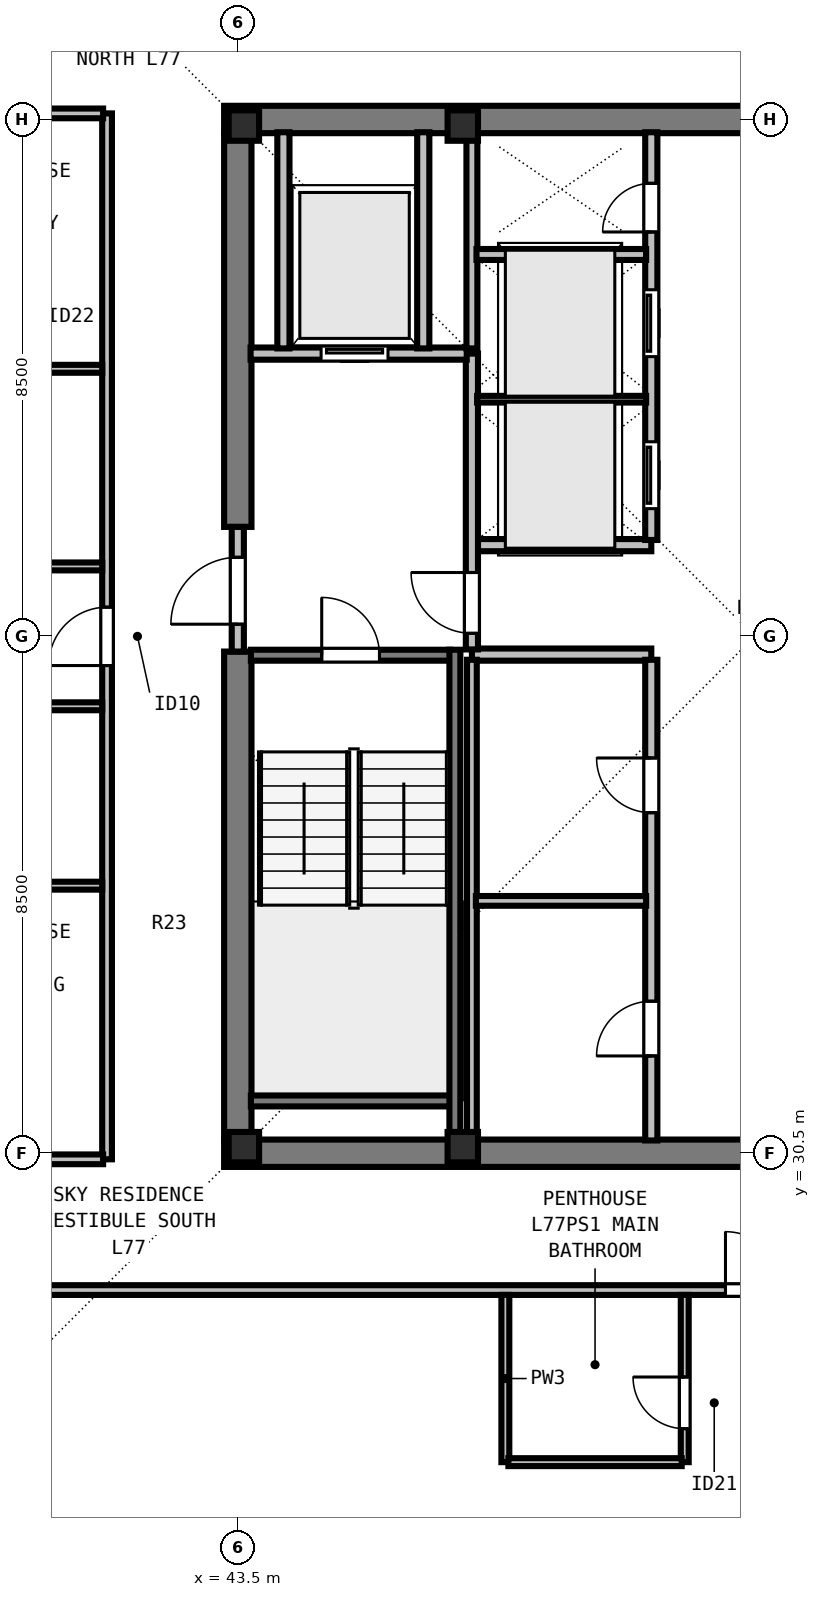
"""IFC4 building model, lengths in metres.
Left out: names, types, materials, properties, quantities, classifications, styles, units other than length and angle.
Written with IfcOpenShell. Run it as: python <this file> out.ifc"""

import sys

from ifc_helpers import new_model, si_unit, direction, frame, frame_2d, origin, origin_2d, place, context, subcontext, project, spatial, rectangle, i_section, extrude, element, fill, save


model = new_model("IFC4")
c1 = context("Model", 3, precision=1e-05, world=origin(), true_north=direction((0.0, 1.0)))
c2 = subcontext(c1, "Body", "Model", "MODEL_VIEW")
j1 = project(units=[si_unit("LENGTHUNIT", "METRE"), si_unit("PLANEANGLEUNIT", "RADIAN")], contexts=[c1])
p1 = place(None, origin())
s1 = spatial("IfcSite", under=j1, at=p1, CompositionType="ELEMENT")
p2 = place(p1, origin())
s2 = spatial("IfcBuilding", under=s1, at=p2, CompositionType="ELEMENT")
p3 = place(p2, frame((0.0, 0.0, 280.5)))
s3 = spatial("IfcBuildingStorey", under=s2, at=p3, CompositionType="ELEMENT", Elevation=280.5)
for number, where, z_axis, x_axis in (
    (1, (43.6, 30.6, 0.0), (0.0, 0.0, 1.0), (1.0, 0.0, 0.0)),
    (2, (47.2, 30.6, 0.0), (0.0, 0.0, 1.0), (1.0, 0.0, 0.0)),
    (3, (43.6, 47.4, 0.0), (0.0, 0.0, 1.0), (1.0, 0.0, 0.0)),
    (4, (47.2, 47.4, 0.0), (0.0, 0.0, 1.0), (1.0, 0.0, 0.0)),
):
    element("IfcColumn", number, at=place(p3, frame(where, z_axis=z_axis, x_axis=x_axis)), inside=s3, PredefinedType="COLUMN", context=c2, shape_type="SweptSolid", body=[
        extrude(i_section(OverallWidth=0.5, OverallDepth=0.5, WebThickness=0.028, FlangeThickness=0.045, at=origin_2d()), origin(), (0.0, 0.0, 1.0), 3.5),
    ])
for number, where, z_axis, x_axis in (
    (5, (43.275, 30.5, 0.0), (0.0, 0.0, 1.0), (1.0, 0.0, 0.0)),
    (6, (43.275, 47.5, 0.0), (0.0, 0.0, 1.0), (1.0, 0.0, 0.0)),
):
    element("IfcWall", number, at=place(p3, frame(where, z_axis=z_axis, x_axis=x_axis)), inside=s3, PredefinedType="SHEAR", context=c2, shape_type="SweptSolid", body=[
        extrude(rectangle(XDim=17.45, YDim=0.45, at=frame_2d((8.725, 0.0))), origin(), (0.0, 0.0, 1.0), 3.29),
    ])
p4 = place(p3, frame((43.5, 30.715, 0.0), z_axis=(0.0, 0.0, 1.0), x_axis=(0.0, 1.0, 0.0)))
e7 = element("IfcWall", 7, at=p4, inside=s3, PredefinedType="SHEAR", context=c2, shape_type="SweptSolid", body=[
    extrude(rectangle(XDim=8.035, YDim=0.45, at=frame_2d((4.018, 0.0))), origin(), (0.0, 0.0, 1.0), 3.29),
])
p5 = place(p3, frame((43.5, 40.8, 0.0), z_axis=(0.0, 0.0, 1.0), x_axis=(0.0, 1.0, 0.0)))
e8 = element("IfcWall", 8, at=p5, inside=s3, PredefinedType="SHEAR", context=c2, shape_type="SweptSolid", body=[
    extrude(rectangle(XDim=6.485, YDim=0.45, at=frame_2d((3.242, 0.0))), origin(), (0.0, 0.0, 1.0), 3.29),
])
for number, where, z_axis, x_axis in (
    (9, (47.35, 38.7, 0.0), (0.0, 0.0, 1.0), (1.0, 0.0, 0.0)),
    (10, (47.35, 40.5, 0.0), (0.0, 0.0, 1.0), (1.0, 0.0, 0.0)),
):
    element("IfcWall", number, at=place(p3, frame(where, z_axis=z_axis, x_axis=x_axis)), inside=s3, PredefinedType="SOLIDWALL", context=c2, shape_type="SweptSolid", body=[
        extrude(rectangle(XDim=2.95, YDim=0.2, at=frame_2d((1.475, 0.0))), origin(), (0.0, 0.0, 1.0), 3.29),
    ])
p6 = place(p3, frame((50.3, 30.71, 0.0), z_axis=(0.0, 0.0, 1.0), x_axis=(0.0, 1.0, 0.0)))
e11 = element("IfcWall", 11, at=p6, inside=s3, PredefinedType="SOLIDWALL", context=c2, shape_type="SweptSolid", body=[
    extrude(rectangle(XDim=7.905, YDim=0.2, at=frame_2d((3.953, 0.0))), origin(), (0.0, 0.0, 1.0), 3.29),
])
p7 = place(p6, frame((1.39, 0.0, 0.0)))
e12 = element("IfcOpeningElement", 12, at=p7, cuts=e11, PredefinedType="OPENING", context=c2, shape_type="SweptSolid", body=[
    extrude(rectangle(XDim=0.9, YDim=2.12, at=frame_2d((0.45, 1.06))), frame((0.0, 0.11, 0.0), z_axis=(0.0, -1.0, 0.0), x_axis=(1.0, 0.0, 0.0)), (0.0, 0.0, 1.0), 0.22),
])
p8 = place(p6, frame((5.39, 0.0, 0.0)))
e13 = element("IfcOpeningElement", 13, at=p8, cuts=e11, PredefinedType="OPENING", context=c2, shape_type="SweptSolid", body=[
    extrude(rectangle(XDim=0.9, YDim=2.12, at=frame_2d((0.45, 1.06))), frame((0.0, 0.11, 0.0), z_axis=(0.0, -1.0, 0.0), x_axis=(1.0, 0.0, 0.0)), (0.0, 0.0, 1.0), 0.22),
])
p9 = place(p3, frame((50.3, 40.585, 0.0), z_axis=(0.0, 0.0, 1.0), x_axis=(0.0, 1.0, 0.0)))
e14 = element("IfcWall", 14, at=p9, inside=s3, PredefinedType="SOLIDWALL", context=c2, shape_type="SweptSolid", body=[
    extrude(rectangle(XDim=6.705, YDim=0.2, at=frame_2d((3.353, 0.0))), origin(), (0.0, 0.0, 1.0), 3.29),
])
p10 = place(p9, frame((0.515, 0.0, 0.0)))
e15 = element("IfcOpeningElement", 15, at=p10, cuts=e14, PredefinedType="OPENING", context=c2, shape_type="SweptSolid", body=[
    extrude(rectangle(XDim=1.1, YDim=2.2, at=frame_2d((0.55, 1.1))), frame((0.0, 0.11, 0.0), z_axis=(0.0, -1.0, 0.0), x_axis=(1.0, 0.0, 0.0)), (0.0, 0.0, 1.0), 0.22),
])
p11 = place(p9, frame((3.015, 0.0, 0.0)))
e16 = element("IfcOpeningElement", 16, at=p11, cuts=e14, PredefinedType="OPENING", context=c2, shape_type="SweptSolid", body=[
    extrude(rectangle(XDim=1.1, YDim=2.2, at=frame_2d((0.55, 1.1))), frame((0.0, 0.11, 0.0), z_axis=(0.0, -1.0, 0.0), x_axis=(1.0, 0.0, 0.0)), (0.0, 0.0, 1.0), 0.22),
])
p12 = place(p9, frame((5.065, 0.0, 0.0)))
e17 = element("IfcOpeningElement", 17, at=p12, cuts=e14, PredefinedType="OPENING", context=c2, shape_type="SweptSolid", body=[
    extrude(rectangle(XDim=0.8, YDim=2.08, at=frame_2d((0.4, 1.04))), frame((0.0, 0.11, 0.0), z_axis=(0.0, -1.0, 0.0), x_axis=(1.0, 0.0, 0.0)), (0.0, 0.0, 1.0), 0.22),
])
p13 = place(p3, frame((43.5, 38.75, 0.0), z_axis=(0.0, 0.0, 1.0), x_axis=(0.0, 1.0, 0.0)))
e18 = element("IfcWall", 18, at=p13, inside=s3, PredefinedType="SOLIDWALL", context=c2, shape_type="SweptSolid", body=[
    extrude(rectangle(XDim=2.05, YDim=0.2, at=frame_2d((1.025, 0.0))), origin(), (0.0, 0.0, 1.0), 3.29),
])
p14 = place(p13, frame((0.45, 0.0, 0.0)))
e19 = element("IfcOpeningElement", 19, at=p14, cuts=e18, PredefinedType="OPENING", context=c2, shape_type="SweptSolid", body=[
    extrude(rectangle(XDim=1.1, YDim=2.15, at=frame_2d((0.55, 1.075))), frame((0.0, 0.11, 0.0), z_axis=(0.0, -1.0, 0.0), x_axis=(1.0, 0.0, 0.0)), (0.0, 0.0, 1.0), 0.22),
])
p15 = place(p3, frame((47.35, 38.785, 0.0), z_axis=(0.0, 0.0, 1.0), x_axis=(0.0, 1.0, 0.0)))
e20 = element("IfcWall", 20, at=p15, inside=s3, PredefinedType="SOLIDWALL", context=c2, shape_type="SweptSolid", body=[
    extrude(rectangle(XDim=4.865, YDim=0.2, at=frame_2d((2.433, 0.0))), origin(), (0.0, 0.0, 1.0), 3.29),
])
p16 = place(p15, frame((0.265, 0.0, 0.0)))
e21 = element("IfcOpeningElement", 21, at=p16, cuts=e20, PredefinedType="OPENING", context=c2, shape_type="SweptSolid", body=[
    extrude(rectangle(XDim=1.0, YDim=2.15, at=frame_2d((0.5, 1.075))), frame((0.0, 0.11, 0.0), z_axis=(0.0, -1.0, 0.0), x_axis=(1.0, 0.0, 0.0)), (0.0, 0.0, 1.0), 0.22),
])
p17 = place(p3, frame((43.71, 43.65, 0.0), z_axis=(0.0, 0.0, 1.0), x_axis=(1.0, 0.0, 0.0)))
e22 = element("IfcWall", 22, at=p17, inside=s3, PredefinedType="SOLIDWALL", context=c2, shape_type="SweptSolid", body=[
    extrude(rectangle(XDim=3.555, YDim=0.2, at=frame_2d((1.777, 0.0))), origin(), (0.0, 0.0, 1.0), 3.29),
])
p18 = place(p17, frame((1.16, 0.0, 0.0)))
e23 = element("IfcOpeningElement", 23, at=p18, cuts=e22, PredefinedType="OPENING", context=c2, shape_type="SweptSolid", body=[
    extrude(rectangle(XDim=1.1, YDim=2.2, at=frame_2d((0.55, 1.1))), frame((0.0, 0.11, 0.0), z_axis=(0.0, -1.0, 0.0), x_axis=(1.0, 0.0, 0.0)), (0.0, 0.0, 1.0), 0.22),
])
for number, where, z_axis, x_axis in (
    (24, (46.55, 43.735, 0.0), (0.0, 0.0, 1.0), (0.0, 1.0, 0.0)),
    (25, (44.25, 43.735, 0.0), (0.0, 0.0, 1.0), (0.0, 1.0, 0.0)),
):
    element("IfcWall", number, at=place(p3, frame(where, z_axis=z_axis, x_axis=x_axis)), inside=s3, PredefinedType="SOLIDWALL", context=c2, shape_type="SweptSolid", body=[
        extrude(rectangle(XDim=3.555, YDim=0.2, at=frame_2d((1.777, 0.0))), origin(), (0.0, 0.0, 1.0), 3.29),
    ])
p19 = place(p3, frame((47.35, 30.71, 0.0), z_axis=(0.0, 0.0, 1.0), x_axis=(0.0, 1.0, 0.0)))
e26 = element("IfcWall", 26, at=p19, inside=s3, PredefinedType="PARTITIONING", context=c2, shape_type="SweptSolid", body=[
    extrude(rectangle(XDim=7.905, YDim=0.16, at=frame_2d((3.953, 0.0))), origin(), (0.0, 0.0, 1.0), 3.29),
])
p20 = place(p3, frame((47.415, 34.65, 0.0), z_axis=(0.0, 0.0, 1.0), x_axis=(1.0, 0.0, 0.0)))
e27 = element("IfcWall", 27, at=p20, inside=s3, PredefinedType="PARTITIONING", context=c2, shape_type="SweptSolid", body=[
    extrude(rectangle(XDim=2.8, YDim=0.16, at=frame_2d((1.4, 0.0))), origin(), (0.0, 0.0, 1.0), 3.29),
])
p21 = place(p3, frame((47.35, 43.735, 0.0), z_axis=(0.0, 0.0, 1.0), x_axis=(0.0, 1.0, 0.0)))
e28 = element("IfcWall", 28, at=p21, inside=s3, PredefinedType="SOLIDWALL", context=c2, shape_type="SweptSolid", body=[
    extrude(rectangle(XDim=3.555, YDim=0.18, at=frame_2d((1.777, 0.0))), origin(), (0.0, 0.0, 1.0), 3.29),
])
p22 = place(p3, frame((47.435, 42.9, 0.0), z_axis=(0.0, 0.0, 1.0), x_axis=(1.0, 0.0, 0.0)))
e29 = element("IfcWall", 29, at=p22, inside=s3, PredefinedType="PARTITIONING", context=c2, shape_type="SweptSolid", body=[
    extrude(rectangle(XDim=2.78, YDim=0.11, at=frame_2d((1.39, 0.0))), origin(), (0.0, 0.0, 1.0), 3.29),
])
p23 = place(p3, frame((47.425, 45.28, 0.0), z_axis=(0.0, 0.0, 1.0), x_axis=(1.0, 0.0, 0.0)))
e30 = element("IfcWall", 30, at=p23, inside=s3, PredefinedType="SOLIDWALL", context=c2, shape_type="SweptSolid", body=[
    extrude(rectangle(XDim=2.79, YDim=0.18, at=frame_2d((1.395, 0.0))), origin(), (0.0, 0.0, 1.0), 3.29),
])
p24 = place(p3, frame((31.285, 28.25, 0.0), z_axis=(0.0, 0.0, 1.0), x_axis=(1.0, 0.0, 0.0)))
e31 = element("IfcWall", 31, at=p24, inside=s3, PredefinedType="PARTITIONING", context=c2, shape_type="SweptSolid", body=[
    extrude(rectangle(XDim=41.43, YDim=0.16, at=frame_2d((20.715, 0.0))), origin(), (0.0, 0.0, 1.0), 3.009),
])
p25 = place(p24, frame((20.235, 0.0, 0.0)))
e32 = element("IfcOpeningElement", 32, at=p25, cuts=e31, PredefinedType="OPENING", context=c2, shape_type="SweptSolid", body=[
    extrude(rectangle(XDim=0.96, YDim=2.18, at=frame_2d((0.48, 1.09))), frame((0.0, 0.09, 0.0), z_axis=(0.0, -1.0, 0.0), x_axis=(1.0, 0.0, 0.0)), (0.0, 0.0, 1.0), 0.18),
])
p26 = place(p3, frame((41.35, 30.4, 0.0), z_axis=(0.0, 0.0, 1.0), x_axis=(0.0, 1.0, 0.0)))
e33 = element("IfcWall", 33, at=p26, inside=s3, PredefinedType="PARTITIONING", context=c2, shape_type="SweptSolid", body=[
    extrude(rectangle(XDim=17.2, YDim=0.16, at=frame_2d((8.6, 0.0))), origin(), (0.0, 0.0, 1.0), 3.009),
])
p27 = place(p26, frame((8.12, 0.0, 0.0)))
e34 = element("IfcOpeningElement", 34, at=p27, cuts=e33, PredefinedType="OPENING", context=c2, shape_type="SweptSolid", body=[
    extrude(rectangle(XDim=0.96, YDim=2.18, at=frame_2d((0.48, 1.09))), frame((0.0, 0.09, 0.0), z_axis=(0.0, -1.0, 0.0), x_axis=(1.0, 0.0, 0.0)), (0.0, 0.0, 1.0), 0.18),
])
for number, where, z_axis, x_axis in (
    (35, (31.285, 30.4, 0.0), (0.0, 0.0, 1.0), (1.0, 0.0, 0.0)),
    (36, (31.285, 47.6, 0.0), (0.0, 0.0, 1.0), (1.0, 0.0, 0.0)),
):
    element("IfcWall", number, at=place(p3, frame(where, z_axis=z_axis, x_axis=x_axis)), inside=s3, PredefinedType="PARTITIONING", context=c2, shape_type="SweptSolid", body=[
        extrude(rectangle(XDim=10.0, YDim=0.16, at=frame_2d((5.0, 0.0))), origin(), (0.0, 0.0, 1.0), 3.29),
    ])
p28 = place(p3, frame((47.9, 25.42, 0.0), z_axis=(0.0, 0.0, 1.0), x_axis=(0.0, 1.0, 0.0)))
e37 = element("IfcWall", 37, at=p28, inside=s3, PredefinedType="PLUMBINGWALL", context=c2, shape_type="SweptSolid", body=[
    extrude(rectangle(XDim=2.75, YDim=0.13, at=frame_2d((1.375, 0.0))), origin(), (0.0, 0.0, 1.0), 3.29),
])
p29 = place(p3, frame((50.85, 25.42, 0.0), z_axis=(0.0, 0.0, 1.0), x_axis=(0.0, 1.0, 0.0)))
e38 = element("IfcWall", 38, at=p29, inside=s3, PredefinedType="PLUMBINGWALL", context=c2, shape_type="SweptSolid", body=[
    extrude(rectangle(XDim=2.75, YDim=0.13, at=frame_2d((1.375, 0.0))), origin(), (0.0, 0.0, 1.0), 3.29),
])
p30 = place(p29, frame((0.55, 0.0, 0.0)))
e39 = element("IfcOpeningElement", 39, at=p30, cuts=e38, PredefinedType="OPENING", context=c2, shape_type="SweptSolid", body=[
    extrude(rectangle(XDim=0.85, YDim=2.08, at=frame_2d((0.425, 1.04))), frame((0.0, 0.075, 0.0), z_axis=(0.0, -1.0, 0.0), x_axis=(1.0, 0.0, 0.0)), (0.0, 0.0, 1.0), 0.15),
])
p31 = place(p3, frame((47.95, 25.42, 0.0), z_axis=(0.0, 0.0, 1.0), x_axis=(1.0, 0.0, 0.0)))
e40 = element("IfcWall", 40, at=p31, inside=s3, PredefinedType="PLUMBINGWALL", context=c2, shape_type="SweptSolid", body=[
    extrude(rectangle(XDim=2.85, YDim=0.13, at=frame_2d((1.425, 0.0))), origin(), (0.0, 0.0, 1.0), 3.29),
])
p32 = place(p3, frame((38.52, 34.9, 0.0), z_axis=(0.0, 0.0, 1.0), x_axis=(1.0, 0.0, 0.0)))
e41 = element("IfcWall", 41, at=p32, inside=s3, PredefinedType="PLUMBINGWALL", context=c2, shape_type="SweptSolid", body=[
    extrude(rectangle(XDim=2.75, YDim=0.13, at=frame_2d((1.375, 0.0))), origin(), (0.0, 0.0, 1.0), 3.29),
])
p33 = place(p3, frame((38.52, 37.85, 0.0), z_axis=(0.0, 0.0, 1.0), x_axis=(1.0, 0.0, 0.0)))
e42 = element("IfcWall", 42, at=p33, inside=s3, PredefinedType="PLUMBINGWALL", context=c2, shape_type="SweptSolid", body=[
    extrude(rectangle(XDim=2.75, YDim=0.13, at=frame_2d((1.375, 0.0))), origin(), (0.0, 0.0, 1.0), 3.29),
])
p34 = place(p33, frame((0.55, 0.0, 0.0)))
e43 = element("IfcOpeningElement", 43, at=p34, cuts=e42, PredefinedType="OPENING", context=c2, shape_type="SweptSolid", body=[
    extrude(rectangle(XDim=0.85, YDim=2.08, at=frame_2d((0.425, 1.04))), frame((0.0, 0.075, 0.0), z_axis=(0.0, -1.0, 0.0), x_axis=(1.0, 0.0, 0.0)), (0.0, 0.0, 1.0), 0.15),
])
p35 = place(p3, frame((38.52, 43.4, 0.0), z_axis=(0.0, 0.0, 1.0), x_axis=(1.0, 0.0, 0.0)))
e44 = element("IfcWall", 44, at=p35, inside=s3, PredefinedType="PLUMBINGWALL", context=c2, shape_type="SweptSolid", body=[
    extrude(rectangle(XDim=2.75, YDim=0.13, at=frame_2d((1.375, 0.0))), origin(), (0.0, 0.0, 1.0), 3.29),
])
p36 = place(p3, frame((38.52, 40.15, 0.0), z_axis=(0.0, 0.0, 1.0), x_axis=(1.0, 0.0, 0.0)))
e45 = element("IfcWall", 45, at=p36, inside=s3, PredefinedType="PLUMBINGWALL", context=c2, shape_type="SweptSolid", body=[
    extrude(rectangle(XDim=2.75, YDim=0.13, at=frame_2d((1.375, 0.0))), origin(), (0.0, 0.0, 1.0), 3.29),
])
p37 = place(p36, frame((0.55, 0.0, 0.0)))
e46 = element("IfcOpeningElement", 46, at=p37, cuts=e45, PredefinedType="OPENING", context=c2, shape_type="SweptSolid", body=[
    extrude(rectangle(XDim=0.88, YDim=2.1, at=frame_2d((0.44, 1.05))), frame((0.0, 0.075, 0.0), z_axis=(0.0, -1.0, 0.0), x_axis=(1.0, 0.0, 0.0)), (0.0, 0.0, 1.0), 0.15),
])
p38 = place(p3, frame((43.715, 38.69, 0.0), z_axis=(0.0, 0.0, 1.0), x_axis=(1.0, 0.0, 0.0)))
e47 = element("IfcWall", 47, at=p38, inside=s3, PredefinedType="SOLIDWALL", context=c2, shape_type="SweptSolid", body=[
    extrude(rectangle(XDim=3.28, YDim=0.18, at=frame_2d((1.64, 0.0))), origin(), (0.0, 0.0, 1.0), 3.29),
])
p39 = place(p38, frame((1.165, 0.0, 0.0)))
e48 = element("IfcOpeningElement", 48, at=p39, cuts=e47, PredefinedType="OPENING", context=c2, shape_type="SweptSolid", body=[
    extrude(rectangle(XDim=0.95, YDim=2.15, at=frame_2d((0.475, 1.075))), frame((0.0, 0.1, 0.0), z_axis=(0.0, -1.0, 0.0), x_axis=(1.0, 0.0, 0.0)), (0.0, 0.0, 1.0), 0.2),
])
p40 = place(p3, frame((43.715, 31.36, 0.0), z_axis=(0.0, 0.0, 1.0), x_axis=(1.0, 0.0, 0.0)))
e49 = element("IfcWall", 49, at=p40, inside=s3, PredefinedType="SOLIDWALL", context=c2, shape_type="SweptSolid", body=[
    extrude(rectangle(XDim=3.28, YDim=0.18, at=frame_2d((1.64, 0.0))), origin(), (0.0, 0.0, 1.0), 3.29),
])
p41 = place(p3, frame((47.07, 38.78, 0.0), z_axis=(0.0, 0.0, 1.0), x_axis=(0.0, -1.0, 0.0)))
e50 = element("IfcWall", 50, at=p41, inside=s3, PredefinedType="SOLIDWALL", context=c2, shape_type="SweptSolid", body=[
    extrude(rectangle(XDim=8.067, YDim=0.18, at=frame_2d((4.034, 0.0))), origin(), (0.0, 0.0, 1.0), 3.29),
])
p42 = place(p14, origin())
e51 = element("IfcDoor", 51, at=p42, inside=s3, OperationType="SINGLE_SWING_LEFT", PredefinedType="DOOR", context=c2, shape_type="SweptSolid", body=[
    extrude(rectangle(XDim=1.1, YDim=2.15, at=frame_2d((0.55, 1.075))), frame((0.0, 0.025, 0.0), z_axis=(0.0, -1.0, 0.0), x_axis=(1.0, 0.0, 0.0)), (0.0, 0.0, 1.0), 0.05),
])
fill(e19, e51)
p43 = place(p16, origin())
e52 = element("IfcDoor", 52, at=p43, inside=s3, OperationType="SINGLE_SWING_RIGHT", PredefinedType="DOOR", context=c2, shape_type="SweptSolid", body=[
    extrude(rectangle(XDim=1.0, YDim=2.15, at=frame_2d((0.5, 1.075))), frame((0.0, 0.025, 0.0), z_axis=(0.0, -1.0, 0.0), x_axis=(1.0, 0.0, 0.0)), (0.0, 0.0, 1.0), 0.05),
])
fill(e21, e52)
p44 = place(p18, origin())
e53 = element("IfcDoor", 53, at=p44, inside=s3, OperationType="SLIDING_TO_LEFT", PredefinedType="DOOR", context=c2, shape_type="SweptSolid", body=[
    extrude(rectangle(XDim=1.1, YDim=2.2, at=frame_2d((0.55, 1.1))), frame((0.0, 0.025, 0.0), z_axis=(0.0, -1.0, 0.0), x_axis=(1.0, 0.0, 0.0)), (0.0, 0.0, 1.0), 0.05),
])
fill(e23, e53)
p45 = place(p7, origin())
e54 = element("IfcDoor", 54, at=p45, inside=s3, OperationType="SINGLE_SWING_LEFT", PredefinedType="DOOR", context=c2, shape_type="SweptSolid", body=[
    extrude(rectangle(XDim=0.9, YDim=2.12, at=frame_2d((0.45, 1.06))), frame((0.0, 0.025, 0.0), z_axis=(0.0, -1.0, 0.0), x_axis=(1.0, 0.0, 0.0)), (0.0, 0.0, 1.0), 0.05),
])
fill(e12, e54)
p46 = place(p8, origin())
e55 = element("IfcDoor", 55, at=p46, inside=s3, OperationType="SINGLE_SWING_RIGHT", PredefinedType="DOOR", context=c2, shape_type="SweptSolid", body=[
    extrude(rectangle(XDim=0.9, YDim=2.12, at=frame_2d((0.45, 1.06))), frame((0.0, 0.025, 0.0), z_axis=(0.0, -1.0, 0.0), x_axis=(1.0, 0.0, 0.0)), (0.0, 0.0, 1.0), 0.05),
])
fill(e13, e55)
p47 = place(p10, origin())
e56 = element("IfcDoor", 56, at=p47, inside=s3, OperationType="SLIDING_TO_LEFT", PredefinedType="DOOR", context=c2, shape_type="SweptSolid", body=[
    extrude(rectangle(XDim=1.1, YDim=2.2, at=frame_2d((0.55, 1.1))), frame((0.0, 0.025, 0.0), z_axis=(0.0, -1.0, 0.0), x_axis=(1.0, 0.0, 0.0)), (0.0, 0.0, 1.0), 0.05),
])
fill(e15, e56)
p48 = place(p11, origin())
e57 = element("IfcDoor", 57, at=p48, inside=s3, OperationType="SLIDING_TO_LEFT", PredefinedType="DOOR", context=c2, shape_type="SweptSolid", body=[
    extrude(rectangle(XDim=1.1, YDim=2.2, at=frame_2d((0.55, 1.1))), frame((0.0, 0.025, 0.0), z_axis=(0.0, -1.0, 0.0), x_axis=(1.0, 0.0, 0.0)), (0.0, 0.0, 1.0), 0.05),
])
fill(e16, e57)
p49 = place(p12, origin())
e58 = element("IfcDoor", 58, at=p49, inside=s3, OperationType="SINGLE_SWING_LEFT", PredefinedType="DOOR", context=c2, shape_type="SweptSolid", body=[
    extrude(rectangle(XDim=0.8, YDim=2.08, at=frame_2d((0.4, 1.04))), frame((0.0, 0.025, 0.0), z_axis=(0.0, -1.0, 0.0), x_axis=(1.0, 0.0, 0.0)), (0.0, 0.0, 1.0), 0.05),
])
fill(e17, e58)
p50 = place(p30, origin())
e59 = element("IfcDoor", 59, at=p50, inside=s3, OperationType="SINGLE_SWING_RIGHT", PredefinedType="DOOR", context=c2, shape_type="SweptSolid", body=[
    extrude(rectangle(XDim=0.85, YDim=2.08, at=frame_2d((0.425, 1.04))), frame((0.0, 0.025, 0.0), z_axis=(0.0, -1.0, 0.0), x_axis=(1.0, 0.0, 0.0)), (0.0, 0.0, 1.0), 0.05),
])
fill(e39, e59)
p51 = place(p25, origin())
e60 = element("IfcDoor", 60, at=p51, inside=s3, OperationType="SINGLE_SWING_LEFT", PredefinedType="DOOR", context=c2, shape_type="SweptSolid", body=[
    extrude(rectangle(XDim=0.96, YDim=2.18, at=frame_2d((0.48, 1.09))), frame((0.0, 0.025, 0.0), z_axis=(0.0, -1.0, 0.0), x_axis=(1.0, 0.0, 0.0)), (0.0, 0.0, 1.0), 0.05),
])
fill(e32, e60)
p52 = place(p27, origin())
e61 = element("IfcDoor", 61, at=p52, inside=s3, OperationType="SINGLE_SWING_LEFT", PredefinedType="DOOR", context=c2, shape_type="SweptSolid", body=[
    extrude(rectangle(XDim=0.96, YDim=2.18, at=frame_2d((0.48, 1.09))), frame((0.0, 0.025, 0.0), z_axis=(0.0, -1.0, 0.0), x_axis=(1.0, 0.0, 0.0)), (0.0, 0.0, 1.0), 0.05),
])
fill(e34, e61)
p53 = place(p39, origin())
e62 = element("IfcDoor", 62, at=p53, inside=s3, OperationType="SINGLE_SWING_LEFT", PredefinedType="DOOR", context=c2, shape_type="SweptSolid", body=[
    extrude(rectangle(XDim=0.95, YDim=2.15, at=frame_2d((0.475, 1.075))), frame((0.0, 0.025, 0.0), z_axis=(0.0, -1.0, 0.0), x_axis=(1.0, 0.0, 0.0)), (0.0, 0.0, 1.0), 0.05),
])
fill(e48, e62)
save(model, sys.argv[1])
